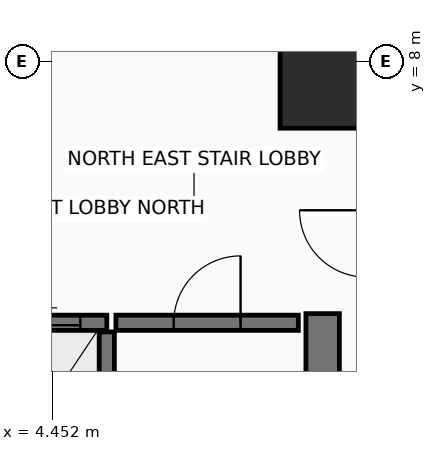
"""IFC4 building model, lengths in metres.
Left out: names, types, materials, properties, quantities, classifications, styles, units other than length and angle.
Written with IfcOpenShell. Run it as: python <this file> out.ifc"""

import sys

from ifc_helpers import new_model, si_unit, direction, frame, frame_2d, origin, origin_2d, place, context, subcontext, project, spatial, rectangle, extrude, element, fill, save


model = new_model("IFC4")
c1 = context("Model", 3, precision=1e-05, world=origin(), true_north=direction((0.0, 1.0)))
c2 = subcontext(c1, "Body", "Model", "MODEL_VIEW")
j1 = project(units=[si_unit("LENGTHUNIT", "METRE"), si_unit("PLANEANGLEUNIT", "RADIAN")], contexts=[c1])
p1 = place(None, origin())
s1 = spatial("IfcSite", under=j1, at=p1, CompositionType="ELEMENT")
p2 = place(p1, origin())
s2 = spatial("IfcBuilding", under=s1, at=p2, CompositionType="ELEMENT")
p3 = place(p2, frame((0.0, 0.0, 63.85)))
s3 = spatial("IfcBuildingStorey", under=s2, at=p3, CompositionType="ELEMENT", Elevation=63.85)
p4 = place(p3, frame((8.9, 7.6, 0.0), z_axis=(0.0, 0.0, 1.0), x_axis=(1.0, 0.0, 0.0)))
e1 = element("IfcColumn", 1, at=p4, inside=s3, PredefinedType="COLUMN", context=c2, shape_type="SweptSolid", body=[
    extrude(rectangle(XDim=1.4, YDim=1.4, at=origin_2d()), origin(), (0.0, 0.0, 1.0), 3.45),
])
p5 = place(p3, frame((8.9, -6.85, 0.0), z_axis=(0.0, 0.0, 1.0), x_axis=(0.0, 1.0, 0.0)))
e2 = element("IfcWall", 2, at=p5, inside=s3, PredefinedType="SHEAR", context=c2, shape_type="SweptSolid", body=[
    extrude(rectangle(XDim=10.7, YDim=0.55, at=frame_2d((5.35, 0.0))), origin(), (0.0, 0.0, 1.0), 3.275),
])
p6 = place(p3, frame((5.35, -3.75, 0.0), z_axis=(0.0, 0.0, 1.0), x_axis=(0.0, 1.0, 0.0)))
e3 = element("IfcWall", 3, at=p6, inside=s3, PredefinedType="SHEAR", context=c2, shape_type="SweptSolid", body=[
    extrude(rectangle(XDim=7.3, YDim=0.25, at=frame_2d((3.65, 0.0))), origin(), (0.0, 0.0, 1.0), 3.275),
])
p7 = place(p3, frame((5.5, 3.7, 0.0), z_axis=(0.0, 0.0, 1.0), x_axis=(1.0, 0.0, 0.0)))
e4 = element("IfcWall", 4, at=p7, inside=s3, PredefinedType="SHEAR", context=c2, shape_type="SweptSolid", body=[
    extrude(rectangle(XDim=3.0, YDim=0.25, at=frame_2d((1.5, 0.0))), origin(), (0.0, 0.0, 1.0), 3.275),
])
p8 = place(p7, frame((0.95, 0.0, 0.0)))
e5 = element("IfcOpeningElement", 5, at=p8, cuts=e4, PredefinedType="OPENING", context=c2, shape_type="SweptSolid", body=[
    extrude(rectangle(XDim=1.1, YDim=2.15, at=frame_2d((0.55, 1.075))), frame((0.0, 0.135, 0.0), z_axis=(0.0, -1.0, 0.0), x_axis=(1.0, 0.0, 0.0)), (0.0, 0.0, 1.0), 0.27),
])
p9 = place(p3, frame((3.28, 3.7, 0.0), z_axis=(0.0, 0.0, 1.0), x_axis=(1.0, 0.0, 0.0)))
e6 = element("IfcWall", 6, at=p9, inside=s3, PredefinedType="SHEAR", context=c2, shape_type="SweptSolid", body=[
    extrude(rectangle(XDim=2.07, YDim=0.25, at=frame_2d((1.035, 0.0))), origin(), (0.0, 0.0, 1.0), 3.275),
])
p10 = place(p9, frame((0.435, 0.0, 0.0)))
e7 = element("IfcOpeningElement", 7, at=p10, cuts=e6, PredefinedType="OPENING", context=c2, shape_type="SweptSolid", body=[
    extrude(rectangle(XDim=1.2, YDim=2.2, at=frame_2d((0.6, 1.1))), frame((0.0, 0.135, 0.0), z_axis=(0.0, -1.0, 0.0), x_axis=(1.0, 0.0, 0.0)), (0.0, 0.0, 1.0), 0.27),
])
p11 = place(p8, frame((1.1, 0.0, 0.0), z_axis=(0.0, 0.0, 1.0), x_axis=(-1.0, 0.0, 0.0)))
e8 = element("IfcDoor", 8, at=p11, inside=s3, OperationType="SINGLE_SWING_LEFT", PredefinedType="DOOR", context=c2, shape_type="SweptSolid", body=[
    extrude(rectangle(XDim=1.1, YDim=2.15, at=frame_2d((0.55, 1.075))), frame((0.0, 0.025, 0.0), z_axis=(0.0, -1.0, 0.0), x_axis=(1.0, 0.0, 0.0)), (0.0, 0.0, 1.0), 0.05),
])
fill(e5, e8)
p12 = place(p10, origin())
e9 = element("IfcDoor", 9, at=p12, inside=s3, OperationType="SLIDING_TO_RIGHT", PredefinedType="DOOR", context=c2, shape_type="SweptSolid", body=[
    extrude(rectangle(XDim=1.2, YDim=2.2, at=frame_2d((0.6, 1.1))), frame((0.0, 0.025, 0.0), z_axis=(0.0, -1.0, 0.0), x_axis=(1.0, 0.0, 0.0)), (0.0, 0.0, 1.0), 0.05),
])
fill(e7, e9)
save(model, sys.argv[1])
